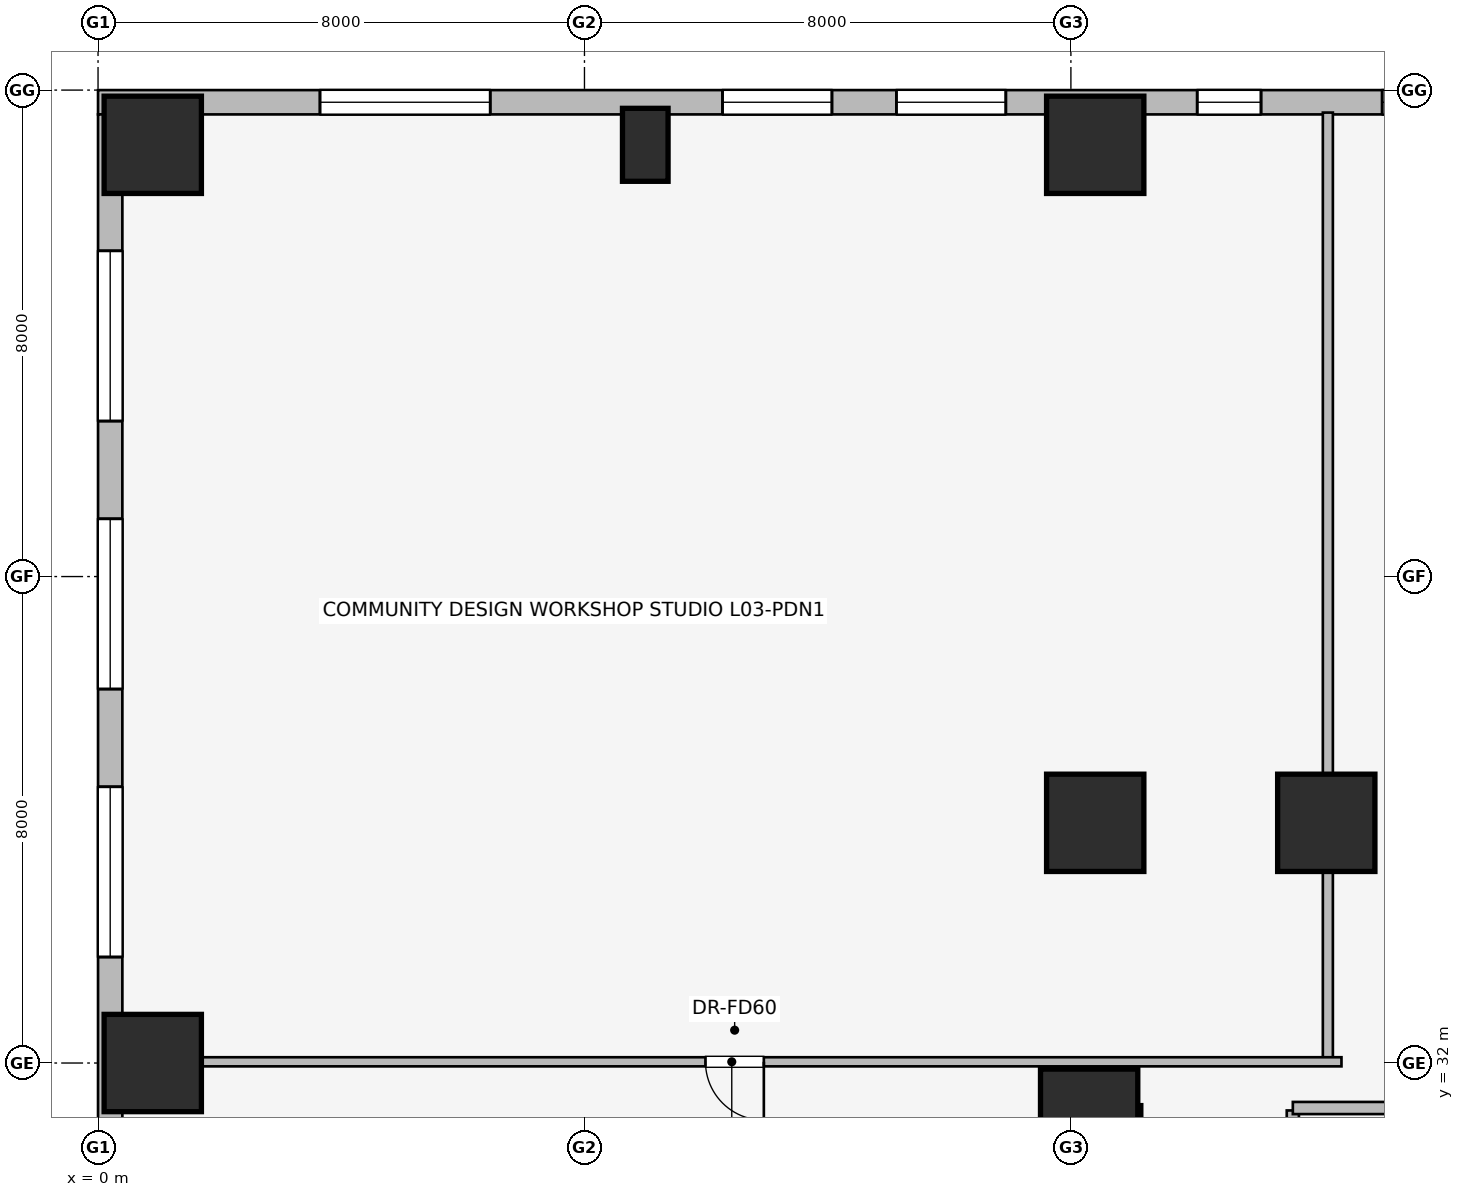
"""IFC4 building model, lengths in metres.
Left out: names, types, materials, properties, quantities, classifications, styles, units other than length and angle.
Written with IfcOpenShell. Run it as: python <this file> out.ifc"""

import sys

from ifc_helpers import new_model, si_unit, direction, frame, frame_2d, origin, origin_2d, place, context, subcontext, project, spatial, rectangle, extrude, element, fill, save


model = new_model("IFC4")
c1 = context("Model", 3, precision=1e-05, world=origin(), true_north=direction((0.0, 1.0)))
c2 = subcontext(c1, "Body", "Model", "MODEL_VIEW")
j1 = project(units=[si_unit("LENGTHUNIT", "METRE"), si_unit("PLANEANGLEUNIT", "RADIAN")], contexts=[c1])
p1 = place(None, origin())
s1 = spatial("IfcSite", under=j1, at=p1, CompositionType="ELEMENT")
p2 = place(p1, origin())
s2 = spatial("IfcBuilding", under=s1, at=p2, CompositionType="ELEMENT")
p3 = place(p2, frame((0.0, 0.0, 11.0)))
s3 = spatial("IfcBuildingStorey", under=s2, at=p3, CompositionType="ELEMENT", Elevation=11.0)
p4 = place(p3, frame((16.85, 25.68, 0.0), z_axis=(0.0, 0.0, 1.0), x_axis=(0.0, 1.0, 0.0)))
e1 = element("IfcWall", 1, at=p4, inside=s3, PredefinedType="SHEAR", context=c2, shape_type="SweptSolid", body=[
    extrude(rectangle(XDim=5.62, YDim=0.6, at=frame_2d((2.81, 0.0))), origin(), (0.0, 0.0, 1.0), 5.0),
])
for number, where, z_axis, x_axis in (
    (2, (16.3, 31.1, 0.0), (0.0, 0.0, 1.0), (1.0, 0.0, 0.0)),
    (3, (0.9, 47.1, 0.0), (0.0, 0.0, 1.0), (1.0, 0.0, 0.0)),
    (4, (16.4, 47.1, 0.0), (0.0, 0.0, 1.0), (1.0, 0.0, 0.0)),
    (5, (0.9, 32.0, 0.0), (0.0, 0.0, 1.0), (1.0, 0.0, 0.0)),
    (6, (20.2, 35.95, 0.0), (0.0, 0.0, 1.0), (1.0, 0.0, 0.0)),
    (7, (16.4, 35.95, 0.0), (0.0, 0.0, 1.0), (1.0, 0.0, 0.0)),
):
    element("IfcColumn", number, at=place(p3, frame(where, z_axis=z_axis, x_axis=x_axis)), inside=s3, PredefinedType="COLUMN", context=c2, shape_type="SweptSolid", body=[
        extrude(rectangle(XDim=1.6, YDim=1.6, at=origin_2d()), origin(), (0.0, 0.0, 1.0), 5.0),
    ])
p5 = place(p3, frame((9.0, 47.1, 0.0), z_axis=(0.0, 0.0, 1.0), x_axis=(1.0, 0.0, 0.0)))
e8 = element("IfcColumn", 8, at=p5, inside=s3, PredefinedType="PILASTER", context=c2, shape_type="SweptSolid", body=[
    extrude(rectangle(XDim=0.75, YDim=1.2, at=origin_2d()), origin(), (0.0, 0.0, 1.0), 5.0),
])
p6 = place(p3, frame((0.0, 47.8, 0.0), z_axis=(0.0, 0.0, 1.0), x_axis=(1.0, 0.0, 0.0)))
e9 = element("IfcWall", 9, at=p6, inside=s3, PredefinedType="STANDARD", context=c2, shape_type="SweptSolid", body=[
    extrude(rectangle(XDim=24.0, YDim=0.4, at=frame_2d((12.0, 0.0))), origin(), (0.0, 0.0, 1.0), 4.69),
])
p7 = place(p6, frame((3.65, 0.0, 0.75)))
e10 = element("IfcOpeningElement", 10, at=p7, cuts=e9, PredefinedType="OPENING", context=c2, shape_type="SweptSolid", body=[
    extrude(rectangle(XDim=2.8, YDim=1.8, at=frame_2d((1.4, 0.9))), frame((0.0, 0.21, 0.0), z_axis=(0.0, -1.0, 0.0), x_axis=(1.0, 0.0, 0.0)), (0.0, 0.0, 1.0), 0.42),
])
p8 = place(p6, frame((10.27, 0.0, 0.75)))
e11 = element("IfcOpeningElement", 11, at=p8, cuts=e9, PredefinedType="OPENING", context=c2, shape_type="SweptSolid", body=[
    extrude(rectangle(XDim=1.8, YDim=1.5, at=frame_2d((0.9, 0.75))), frame((0.0, 0.21, 0.0), z_axis=(0.0, -1.0, 0.0), x_axis=(1.0, 0.0, 0.0)), (0.0, 0.0, 1.0), 0.42),
])
p9 = place(p6, frame((13.13, 0.0, 0.75)))
e12 = element("IfcOpeningElement", 12, at=p9, cuts=e9, PredefinedType="OPENING", context=c2, shape_type="SweptSolid", body=[
    extrude(rectangle(XDim=1.8, YDim=1.5, at=frame_2d((0.9, 0.75))), frame((0.0, 0.21, 0.0), z_axis=(0.0, -1.0, 0.0), x_axis=(1.0, 0.0, 0.0)), (0.0, 0.0, 1.0), 0.42),
])
p10 = place(p6, frame((18.077, 0.0, 0.75)))
e13 = element("IfcOpeningElement", 13, at=p10, cuts=e9, PredefinedType="OPENING", context=c2, shape_type="SweptSolid", body=[
    extrude(rectangle(XDim=1.05, YDim=1.4, at=frame_2d((0.525, 0.7))), frame((0.0, 0.21, 0.0), z_axis=(0.0, -1.0, 0.0), x_axis=(1.0, 0.0, 0.0)), (0.0, 0.0, 1.0), 0.42),
])
p11 = place(p6, frame((21.119, 0.0, 0.75)))
e14 = element("IfcOpeningElement", 14, at=p11, cuts=e9, PredefinedType="OPENING", context=c2, shape_type="SweptSolid", body=[
    extrude(rectangle(XDim=1.8, YDim=1.5, at=frame_2d((0.9, 0.75))), frame((0.0, 0.21, 0.0), z_axis=(0.0, -1.0, 0.0), x_axis=(1.0, 0.0, 0.0)), (0.0, 0.0, 1.0), 0.42),
])
p12 = place(p3, frame((0.2, 31.0, 0.0), z_axis=(0.0, 0.0, 1.0), x_axis=(0.0, 1.0, 0.0)))
e15 = element("IfcWall", 15, at=p12, inside=s3, PredefinedType="STANDARD", context=c2, shape_type="SweptSolid", body=[
    extrude(rectangle(XDim=16.6, YDim=0.4, at=frame_2d((8.3, 0.0))), origin(), (0.0, 0.0, 1.0), 4.69),
])
p13 = place(p12, frame((2.743, 0.0, 0.75)))
e16 = element("IfcOpeningElement", 16, at=p13, cuts=e15, PredefinedType="OPENING", context=c2, shape_type="SweptSolid", body=[
    extrude(rectangle(XDim=2.8, YDim=1.8, at=frame_2d((1.4, 0.9))), frame((0.0, 0.21, 0.0), z_axis=(0.0, -1.0, 0.0), x_axis=(1.0, 0.0, 0.0)), (0.0, 0.0, 1.0), 0.42),
])
p14 = place(p12, frame((7.15, 0.0, 0.75)))
e17 = element("IfcOpeningElement", 17, at=p14, cuts=e15, PredefinedType="OPENING", context=c2, shape_type="SweptSolid", body=[
    extrude(rectangle(XDim=2.8, YDim=1.8, at=frame_2d((1.4, 0.9))), frame((0.0, 0.21, 0.0), z_axis=(0.0, -1.0, 0.0), x_axis=(1.0, 0.0, 0.0)), (0.0, 0.0, 1.0), 0.42),
])
p15 = place(p12, frame((11.557, 0.0, 0.75)))
e18 = element("IfcOpeningElement", 18, at=p15, cuts=e15, PredefinedType="OPENING", context=c2, shape_type="SweptSolid", body=[
    extrude(rectangle(XDim=2.8, YDim=1.8, at=frame_2d((1.4, 0.9))), frame((0.0, 0.21, 0.0), z_axis=(0.0, -1.0, 0.0), x_axis=(1.0, 0.0, 0.0)), (0.0, 0.0, 1.0), 0.42),
])
p16 = place(p3, frame((19.65, 25.68, 0.0), z_axis=(0.0, 0.0, 1.0), x_axis=(0.0, 1.0, 0.0)))
e19 = element("IfcWall", 19, at=p16, inside=s3, PredefinedType="PARTITIONING", context=c2, shape_type="SweptSolid", body=[
    extrude(rectangle(XDim=5.54, YDim=0.2, at=frame_2d((2.77, 0.0))), origin(), (0.0, 0.0, 1.0), 4.69),
])
p17 = place(p16, frame((0.62, 0.0, 0.0)))
e20 = element("IfcOpeningElement", 20, at=p17, cuts=e19, PredefinedType="OPENING", context=c2, shape_type="SweptSolid", body=[
    extrude(rectangle(XDim=1.1, YDim=2.2, at=frame_2d((0.55, 1.1))), frame((0.0, 0.11, 0.0), z_axis=(0.0, -1.0, 0.0), x_axis=(1.0, 0.0, 0.0)), (0.0, 0.0, 1.0), 0.22),
])
p18 = place(p16, frame((3.12, 0.0, 0.0)))
e21 = element("IfcOpeningElement", 21, at=p18, cuts=e19, PredefinedType="OPENING", context=c2, shape_type="SweptSolid", body=[
    extrude(rectangle(XDim=1.1, YDim=2.2, at=frame_2d((0.55, 1.1))), frame((0.0, 0.11, 0.0), z_axis=(0.0, -1.0, 0.0), x_axis=(1.0, 0.0, 0.0)), (0.0, 0.0, 1.0), 0.22),
])
p19 = place(p3, frame((21.33, 31.26, 0.0), z_axis=(0.0, 0.0, 1.0), x_axis=(-1.0, 0.0, 0.0)))
e22 = element("IfcWall", 22, at=p19, inside=s3, PredefinedType="PARTITIONING", context=c2, shape_type="SweptSolid", body=[
    extrude(rectangle(XDim=1.68, YDim=0.2, at=frame_2d((0.84, 0.0))), origin(), (0.0, 0.0, 1.0), 4.69),
])
p20 = place(p3, frame((20.226, 32.09, 0.0), z_axis=(0.0, 0.0, 1.0), x_axis=(0.0, 1.0, 0.0)))
e23 = element("IfcWall", 23, at=p20, inside=s3, PredefinedType="PARTITIONING", context=c2, shape_type="SweptSolid", body=[
    extrude(rectangle(XDim=15.54, YDim=0.165, at=frame_2d((7.77, 0.0))), origin(), (0.0, 0.0, 1.0), 4.69),
])
p21 = place(p3, frame((20.45, 32.02, 0.0), z_axis=(0.0, 0.0, 1.0), x_axis=(-1.0, 0.0, 0.0)))
e24 = element("IfcWall", 24, at=p21, inside=s3, PredefinedType="PARTITIONING", context=c2, shape_type="SweptSolid", body=[
    extrude(rectangle(XDim=20.055, YDim=0.15, at=frame_2d((10.027, 0.0))), origin(), (0.0, 0.0, 1.0), 3.742),
])
p22 = place(p21, frame((9.5, 0.0, 0.0)))
e25 = element("IfcOpeningElement", 25, at=p22, cuts=e24, PredefinedType="OPENING", context=c2, shape_type="SweptSolid", body=[
    extrude(rectangle(XDim=0.96, YDim=2.0, at=frame_2d((0.48, 1.0))), frame((0.0, 0.085, 0.0), z_axis=(0.0, -1.0, 0.0), x_axis=(1.0, 0.0, 0.0)), (0.0, 0.0, 1.0), 0.17),
])
p23 = place(p7, origin())
e26 = element("IfcWindow", 26, at=p23, inside=s3, PartitioningType="SINGLE_PANEL", PredefinedType="WINDOW", context=c2, shape_type="SweptSolid", body=[
    extrude(rectangle(XDim=2.8, YDim=1.8, at=frame_2d((1.4, 0.9))), frame((0.0, 0.03, 0.0), z_axis=(0.0, -1.0, 0.0), x_axis=(1.0, 0.0, 0.0)), (0.0, 0.0, 1.0), 0.06),
])
fill(e10, e26)
p24 = place(p8, origin())
e27 = element("IfcWindow", 27, at=p24, inside=s3, PartitioningType="SINGLE_PANEL", PredefinedType="WINDOW", context=c2, shape_type="SweptSolid", body=[
    extrude(rectangle(XDim=1.8, YDim=1.5, at=frame_2d((0.9, 0.75))), frame((0.0, 0.03, 0.0), z_axis=(0.0, -1.0, 0.0), x_axis=(1.0, 0.0, 0.0)), (0.0, 0.0, 1.0), 0.06),
])
fill(e11, e27)
p25 = place(p9, origin())
e28 = element("IfcWindow", 28, at=p25, inside=s3, PartitioningType="SINGLE_PANEL", PredefinedType="WINDOW", context=c2, shape_type="SweptSolid", body=[
    extrude(rectangle(XDim=1.8, YDim=1.5, at=frame_2d((0.9, 0.75))), frame((0.0, 0.03, 0.0), z_axis=(0.0, -1.0, 0.0), x_axis=(1.0, 0.0, 0.0)), (0.0, 0.0, 1.0), 0.06),
])
fill(e12, e28)
p26 = place(p10, origin())
e29 = element("IfcWindow", 29, at=p26, inside=s3, PartitioningType="SINGLE_PANEL", PredefinedType="WINDOW", context=c2, shape_type="SweptSolid", body=[
    extrude(rectangle(XDim=1.05, YDim=1.4, at=frame_2d((0.525, 0.7))), frame((0.0, 0.03, 0.0), z_axis=(0.0, -1.0, 0.0), x_axis=(1.0, 0.0, 0.0)), (0.0, 0.0, 1.0), 0.06),
])
fill(e13, e29)
p27 = place(p11, origin())
e30 = element("IfcWindow", 30, at=p27, inside=s3, PartitioningType="SINGLE_PANEL", PredefinedType="WINDOW", context=c2, shape_type="SweptSolid", body=[
    extrude(rectangle(XDim=1.8, YDim=1.5, at=frame_2d((0.9, 0.75))), frame((0.0, 0.03, 0.0), z_axis=(0.0, -1.0, 0.0), x_axis=(1.0, 0.0, 0.0)), (0.0, 0.0, 1.0), 0.06),
])
fill(e14, e30)
p28 = place(p13, origin())
e31 = element("IfcWindow", 31, at=p28, inside=s3, PartitioningType="SINGLE_PANEL", PredefinedType="WINDOW", context=c2, shape_type="SweptSolid", body=[
    extrude(rectangle(XDim=2.8, YDim=1.8, at=frame_2d((1.4, 0.9))), frame((0.0, 0.03, 0.0), z_axis=(0.0, -1.0, 0.0), x_axis=(1.0, 0.0, 0.0)), (0.0, 0.0, 1.0), 0.06),
])
fill(e16, e31)
p29 = place(p14, origin())
e32 = element("IfcWindow", 32, at=p29, inside=s3, PartitioningType="SINGLE_PANEL", PredefinedType="WINDOW", context=c2, shape_type="SweptSolid", body=[
    extrude(rectangle(XDim=2.8, YDim=1.8, at=frame_2d((1.4, 0.9))), frame((0.0, 0.03, 0.0), z_axis=(0.0, -1.0, 0.0), x_axis=(1.0, 0.0, 0.0)), (0.0, 0.0, 1.0), 0.06),
])
fill(e17, e32)
p30 = place(p15, origin())
e33 = element("IfcWindow", 33, at=p30, inside=s3, PartitioningType="SINGLE_PANEL", PredefinedType="WINDOW", context=c2, shape_type="SweptSolid", body=[
    extrude(rectangle(XDim=2.8, YDim=1.8, at=frame_2d((1.4, 0.9))), frame((0.0, 0.03, 0.0), z_axis=(0.0, -1.0, 0.0), x_axis=(1.0, 0.0, 0.0)), (0.0, 0.0, 1.0), 0.06),
])
fill(e18, e33)
p31 = place(p22, origin())
e34 = element("IfcDoor", 34, at=p31, inside=s3, OperationType="SINGLE_SWING_LEFT", PredefinedType="DOOR", context=c2, shape_type="SweptSolid", body=[
    extrude(rectangle(XDim=0.96, YDim=2.0, at=frame_2d((0.48, 1.0))), frame((0.0, 0.025, 0.0), z_axis=(0.0, -1.0, 0.0), x_axis=(1.0, 0.0, 0.0)), (0.0, 0.0, 1.0), 0.05),
])
fill(e25, e34)
save(model, sys.argv[1])
